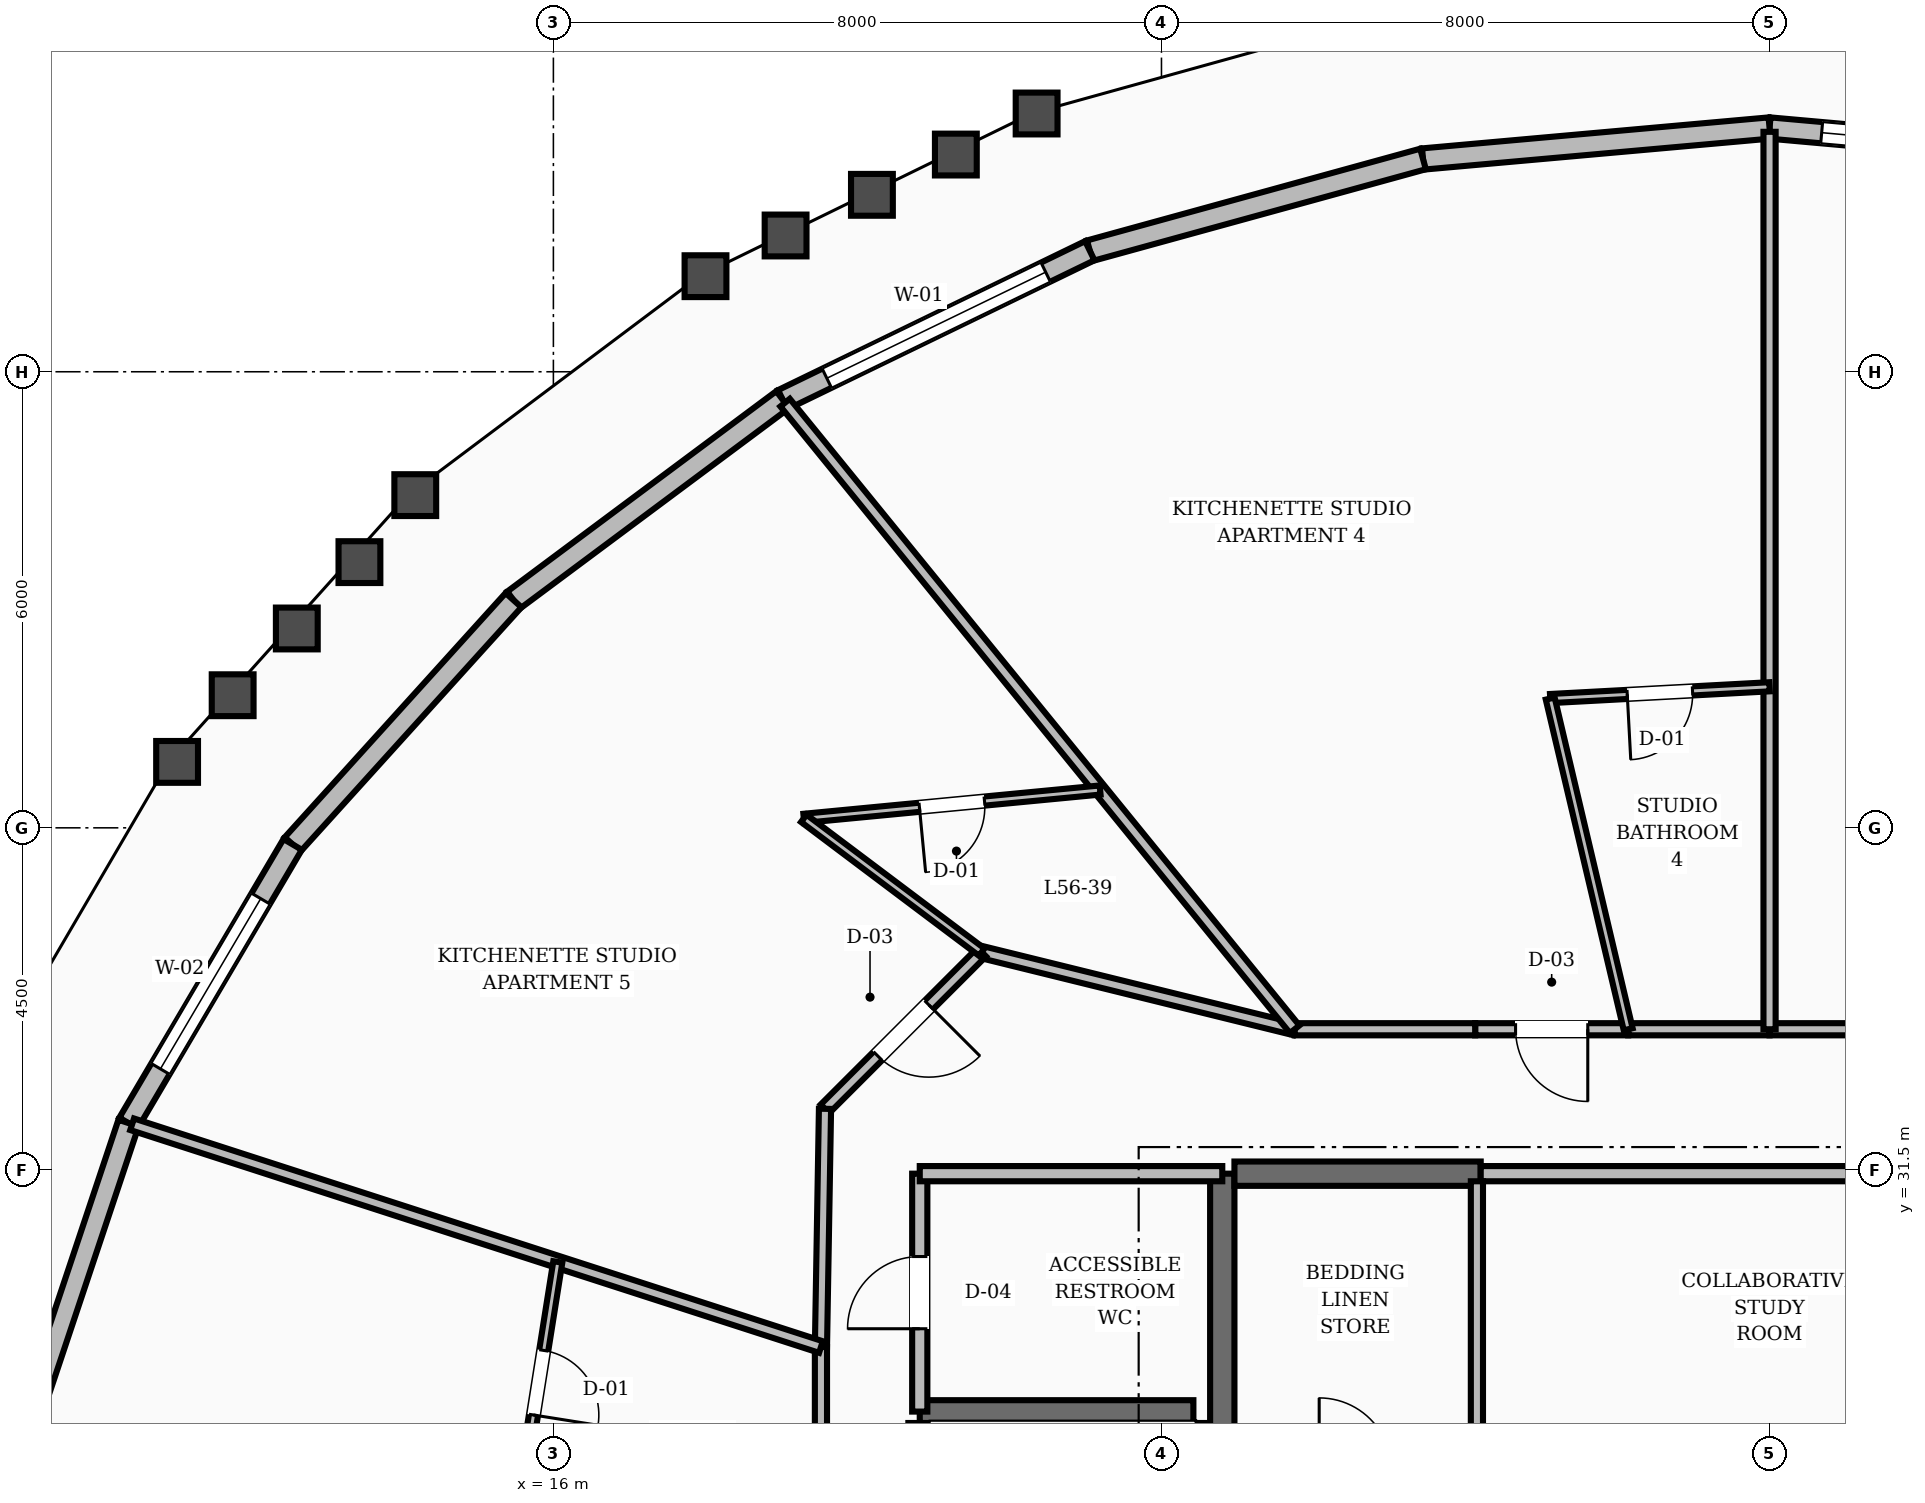
"""IFC4 building model, lengths in metres.
Left out: names, types, materials, properties, quantities, classifications, styles, units other than length and angle.
Written with IfcOpenShell. Run it as: python <this file> out.ifc"""

import sys

from ifc_helpers import new_model, si_unit, direction, frame, frame_2d, origin, place, context, subcontext, project, spatial, rectangle, extrude, element, fill, save


model = new_model("IFC4")
c1 = context("Model", 3, precision=1e-05, world=origin(), true_north=direction((0.0, 1.0)))
c2 = subcontext(c1, "Body", "Model", "MODEL_VIEW")
j1 = project(units=[si_unit("LENGTHUNIT", "METRE"), si_unit("PLANEANGLEUNIT", "RADIAN")], contexts=[c1])
p1 = place(None, origin())
s1 = spatial("IfcSite", under=j1, at=p1, CompositionType="ELEMENT")
p2 = place(p1, origin())
s2 = spatial("IfcBuilding", under=s1, at=p2, CompositionType="ELEMENT")
p3 = place(p2, frame((0.0, 0.0, 218.4)))
s3 = spatial("IfcBuildingStorey", under=s2, at=p3, CompositionType="ELEMENT", Elevation=218.4)
p4 = place(p3, frame((24.8, 25.15, 0.0), z_axis=(0.0, 0.0, 1.0), x_axis=(0.0, 1.0, 0.0)))
e1 = element("IfcWall", 1, at=p4, inside=s3, PredefinedType="SHEAR", context=c2, shape_type="SweptSolid", body=[
    extrude(rectangle(XDim=6.3, YDim=0.32, at=frame_2d((3.15, 0.0))), origin(), (0.0, 0.0, 1.0), 3.6),
])
p5 = place(p3, frame((24.96, 31.45, 0.0), z_axis=(0.0, 0.0, 1.0), x_axis=(1.0, 0.0, 0.0)))
e2 = element("IfcWall", 2, at=p5, inside=s3, PredefinedType="SHEAR", context=c2, shape_type="SweptSolid", body=[
    extrude(rectangle(XDim=3.24, YDim=0.32, at=frame_2d((1.62, 0.0))), origin(), (0.0, 0.0, 1.0), 3.6),
])
for number, where, z_axis, x_axis in (
    (3, (20.82, 19.43, 0.0), (0.0, 0.0, 1.0), (0.0, 1.0, 0.0)),
    (4, (24.42, 19.43, 0.0), (0.0, 0.0, 1.0), (0.0, 1.0, 0.0)),
):
    element("IfcWall", number, at=place(p3, frame(where, z_axis=z_axis, x_axis=x_axis)), inside=s3, PredefinedType="SHEAR", context=c2, shape_type="SweptSolid", body=[
        extrude(rectangle(XDim=8.74, YDim=0.3, at=frame_2d((4.37, 0.0))), origin(), (0.0, 0.0, 1.0), 3.6),
    ])
p6 = place(p3, frame((20.82, 28.32, 0.0), z_axis=(0.0, 0.0, 1.0), x_axis=(1.0, 0.0, 0.0)))
e5 = element("IfcWall", 5, at=p6, inside=s3, PredefinedType="SHEAR", context=c2, shape_type="SweptSolid", body=[
    extrude(rectangle(XDim=3.6, YDim=0.3, at=frame_2d((1.8, 0.0))), origin(), (0.0, 0.0, 1.0), 3.6),
])
p7 = place(p3, frame((36.559, 44.799, 0.0), z_axis=(0.0, 0.0, 1.0), x_axis=(-0.996029770712, 0.089020760807, 0.0)))
e6 = element("IfcWall", 6, at=p7, inside=s3, PredefinedType="STANDARD", context=c2, shape_type="SweptSolid", body=[
    extrude(rectangle(XDim=4.577, YDim=0.28, at=frame_2d((2.289, 0.0))), origin(), (0.0, 0.0, 1.0), 2.88),
])
p8 = place(p7, frame((0.689, 0.0, 0.8)))
e7 = element("IfcOpeningElement", 7, at=p8, cuts=e6, PredefinedType="OPENING", context=c2, shape_type="SweptSolid", body=[
    extrude(rectangle(XDim=3.2, YDim=1.65, at=frame_2d((1.6, 0.825))), frame((0.0, 0.15, 0.0), z_axis=(0.0, -1.0, 0.0), x_axis=(1.0, 0.0, 0.0)), (0.0, 0.0, 1.0), 0.3),
])
p9 = place(p3, frame((32.0, 45.207, 0.0), z_axis=(0.0, 0.0, 1.0), x_axis=(-0.996029770712, -0.089020760807, 0.0)))
e8 = element("IfcWall", 8, at=p9, inside=s3, PredefinedType="STANDARD", context=c2, shape_type="SweptSolid", body=[
    extrude(rectangle(XDim=4.577, YDim=0.28, at=frame_2d((2.289, 0.0))), origin(), (0.0, 0.0, 1.0), 2.88),
])
p10 = place(p3, frame((27.441, 44.799, 0.0), z_axis=(0.0, 0.0, 1.0), x_axis=(-0.964121606476, -0.265460972511, 0.0)))
e9 = element("IfcWall", 9, at=p10, inside=s3, PredefinedType="STANDARD", context=c2, shape_type="SweptSolid", body=[
    extrude(rectangle(XDim=4.547, YDim=0.28, at=frame_2d((2.273, 0.0))), origin(), (0.0, 0.0, 1.0), 2.88),
])
p11 = place(p3, frame((23.057, 43.592, 0.0), z_axis=(0.0, 0.0, 1.0), x_axis=(-0.899755886265, -0.436393566785, 0.0)))
e10 = element("IfcWall", 10, at=p11, inside=s3, PredefinedType="STANDARD", context=c2, shape_type="SweptSolid", body=[
    extrude(rectangle(XDim=4.49, YDim=0.28, at=frame_2d((2.245, 0.0))), origin(), (0.0, 0.0, 1.0), 2.88),
])
p12 = place(p11, frame((0.645, 0.0, 0.8)))
e11 = element("IfcOpeningElement", 11, at=p12, cuts=e10, PredefinedType="OPENING", context=c2, shape_type="SweptSolid", body=[
    extrude(rectangle(XDim=3.2, YDim=1.65, at=frame_2d((1.6, 0.825))), frame((0.0, 0.15, 0.0), z_axis=(0.0, -1.0, 0.0), x_axis=(1.0, 0.0, 0.0)), (0.0, 0.0, 1.0), 0.3),
])
p13 = place(p3, frame((19.017, 41.633, 0.0), z_axis=(0.0, 0.0, 1.0), x_axis=(-0.802005914902, -0.597316090912, 0.0)))
e12 = element("IfcWall", 12, at=p13, inside=s3, PredefinedType="STANDARD", context=c2, shape_type="SweptSolid", body=[
    extrude(rectangle(XDim=4.416, YDim=0.28, at=frame_2d((2.208, 0.0))), origin(), (0.0, 0.0, 1.0), 2.88),
])
p14 = place(p3, frame((15.476, 38.995, 0.0), z_axis=(0.0, 0.0, 1.0), x_axis=(-0.670746586543, -0.741686602711, 0.0)))
e13 = element("IfcWall", 13, at=p14, inside=s3, PredefinedType="STANDARD", context=c2, shape_type="SweptSolid", body=[
    extrude(rectangle(XDim=4.333, YDim=0.28, at=frame_2d((2.167, 0.0))), origin(), (0.0, 0.0, 1.0), 2.88),
])
p15 = place(p3, frame((12.57, 35.782, 0.0), z_axis=(0.0, 0.0, 1.0), x_axis=(-0.50750901232, -0.861646448617, 0.0)))
e14 = element("IfcWall", 14, at=p15, inside=s3, PredefinedType="STANDARD", context=c2, shape_type="SweptSolid", body=[
    extrude(rectangle(XDim=4.255, YDim=0.28, at=frame_2d((2.127, 0.0))), origin(), (0.0, 0.0, 1.0), 2.88),
])
p16 = place(p15, frame((0.827, 0.0, 0.8)))
e15 = element("IfcOpeningElement", 15, at=p16, cuts=e14, PredefinedType="OPENING", context=c2, shape_type="SweptSolid", body=[
    extrude(rectangle(XDim=2.6, YDim=1.65, at=frame_2d((1.3, 0.825))), frame((0.0, 0.15, 0.0), z_axis=(0.0, -1.0, 0.0), x_axis=(1.0, 0.0, 0.0)), (0.0, 0.0, 1.0), 0.3),
])
p17 = place(p3, frame((10.41, 32.115, 0.0), z_axis=(0.0, 0.0, 1.0), x_axis=(-0.317030851827, -0.948415224989, 0.0)))
e16 = element("IfcWall", 16, at=p17, inside=s3, PredefinedType="STANDARD", context=c2, shape_type="SweptSolid", body=[
    extrude(rectangle(XDim=4.195, YDim=0.28, at=frame_2d((2.097, 0.0))), origin(), (0.0, 0.0, 1.0), 2.88),
])
p18 = place(p3, frame((20.82, 28.32, 0.0), z_axis=(0.0, 0.0, 1.0), x_axis=(0.0, 1.0, 0.0)))
e17 = element("IfcWall", 17, at=p18, inside=s3, PredefinedType="SOLIDWALL", context=c2, shape_type="SweptSolid", body=[
    extrude(rectangle(XDim=3.13, YDim=0.2, at=frame_2d((1.565, 0.0))), origin(), (0.0, 0.0, 1.0), 2.87),
])
p19 = place(p18, frame((1.09, 0.0, 0.0)))
e18 = element("IfcOpeningElement", 18, at=p19, cuts=e17, PredefinedType="OPENING", context=c2, shape_type="SweptSolid", body=[
    extrude(rectangle(XDim=0.95, YDim=2.1, at=frame_2d((0.475, 1.05))), frame((0.0, 0.11, 0.0), z_axis=(0.0, -1.0, 0.0), x_axis=(1.0, 0.0, 0.0)), (0.0, 0.0, 1.0), 0.22),
])
p20 = place(p3, frame((20.82, 31.45, 0.0), z_axis=(0.0, 0.0, 1.0), x_axis=(1.0, 0.0, 0.0)))
e19 = element("IfcWall", 19, at=p20, inside=s3, PredefinedType="SOLIDWALL", context=c2, shape_type="SweptSolid", body=[
    extrude(rectangle(XDim=3.98, YDim=0.2, at=frame_2d((1.99, 0.0))), origin(), (0.0, 0.0, 1.0), 2.87),
])
p21 = place(p3, frame((28.2, 31.45, 0.0), z_axis=(0.0, 0.0, 1.0), x_axis=(1.0, 0.0, 0.0)))
e20 = element("IfcWall", 20, at=p21, inside=s3, PredefinedType="SOLIDWALL", context=c2, shape_type="SweptSolid", body=[
    extrude(rectangle(XDim=7.6, YDim=0.2, at=frame_2d((3.8, 0.0))), origin(), (0.0, 0.0, 1.0), 2.87),
])
p22 = place(p3, frame((28.15, 25.25, 0.0), z_axis=(0.0, 0.0, 1.0), x_axis=(0.0, 1.0, 0.0)))
e21 = element("IfcWall", 21, at=p22, inside=s3, PredefinedType="SOLIDWALL", context=c2, shape_type="SweptSolid", body=[
    extrude(rectangle(XDim=6.1, YDim=0.16, at=frame_2d((3.05, 0.0))), origin(), (0.0, 0.0, 1.0), 2.87),
])
for number, where, z_axis, x_axis in (
    (22, (33.86, 33.35, 0.0), (0.0, 0.0, 1.0), (-1.0, 0.0, 0.0)),
    (23, (32.0, 33.35, 0.0), (0.0, 0.0, 1.0), (-1.0, 0.0, 0.0)),
):
    element("IfcWall", number, at=place(p3, frame(where, z_axis=z_axis, x_axis=x_axis)), inside=s3, PredefinedType="SOLIDWALL", context=c2, shape_type="SweptSolid", body=[
        extrude(rectangle(XDim=1.86, YDim=0.16, at=frame_2d((0.93, 0.0))), origin(), (0.0, 0.0, 1.0), 2.87),
    ])
p23 = place(p3, frame((30.14, 33.35, 0.0), z_axis=(0.0, 0.0, 1.0), x_axis=(-1.0, 0.0, 0.0)))
e24 = element("IfcWall", 24, at=p23, inside=s3, PredefinedType="SOLIDWALL", context=c2, shape_type="SweptSolid", body=[
    extrude(rectangle(XDim=2.013, YDim=0.16, at=frame_2d((1.006, 0.0))), origin(), (0.0, 0.0, 1.0), 2.87),
])
p24 = place(p23, frame((0.531, 0.0, 0.0)))
e25 = element("IfcOpeningElement", 25, at=p24, cuts=e24, PredefinedType="OPENING", context=c2, shape_type="SweptSolid", body=[
    extrude(rectangle(XDim=0.95, YDim=2.1, at=frame_2d((0.475, 1.05))), frame((0.0, 0.09, 0.0), z_axis=(0.0, -1.0, 0.0), x_axis=(1.0, 0.0, 0.0)), (0.0, 0.0, 1.0), 0.18),
])
p25 = place(p3, frame((28.127, 33.35, 0.0), z_axis=(0.0, 0.0, 1.0), x_axis=(-1.0, 0.0, 0.0)))
e26 = element("IfcWall", 26, at=p25, inside=s3, PredefinedType="SOLIDWALL", context=c2, shape_type="SweptSolid", body=[
    extrude(rectangle(XDim=2.375, YDim=0.16, at=frame_2d((1.188, 0.0))), origin(), (0.0, 0.0, 1.0), 2.87),
])
p26 = place(p3, frame((25.752, 33.35, 0.0), z_axis=(0.0, 0.0, 1.0), x_axis=(-0.970939799552, 0.239323850978, 0.0)))
e27 = element("IfcWall", 27, at=p26, inside=s3, PredefinedType="SOLIDWALL", context=c2, shape_type="SweptSolid", body=[
    extrude(rectangle(XDim=4.241, YDim=0.16, at=frame_2d((2.12, 0.0))), origin(), (0.0, 0.0, 1.0), 2.87),
])
p27 = place(p3, frame((21.635, 34.365, 0.0), z_axis=(0.0, 0.0, 1.0), x_axis=(-0.707106781187, -0.707106781187, 0.0)))
e28 = element("IfcWall", 28, at=p27, inside=s3, PredefinedType="SOLIDWALL", context=c2, shape_type="SweptSolid", body=[
    extrude(rectangle(XDim=2.916, YDim=0.16, at=frame_2d((1.458, 0.0))), origin(), (0.0, 0.0, 1.0), 2.87),
])
p28 = place(p27, frame((0.983, 0.0, 0.0)))
e29 = element("IfcOpeningElement", 29, at=p28, cuts=e28, PredefinedType="OPENING", context=c2, shape_type="SweptSolid", body=[
    extrude(rectangle(XDim=0.95, YDim=2.1, at=frame_2d((0.475, 1.05))), frame((0.0, 0.09, 0.0), z_axis=(0.0, -1.0, 0.0), x_axis=(1.0, 0.0, 0.0)), (0.0, 0.0, 1.0), 0.18),
])
p29 = place(p3, frame((19.573, 32.303, 0.0), z_axis=(0.0, 0.0, 1.0), x_axis=(-0.016981035134, -0.999855811828, 0.0)))
e30 = element("IfcWall", 30, at=p29, inside=s3, PredefinedType="SOLIDWALL", context=c2, shape_type="SweptSolid", body=[
    extrude(rectangle(XDim=3.134, YDim=0.16, at=frame_2d((1.567, 0.0))), origin(), (0.0, 0.0, 1.0), 2.87),
])
p30 = place(p3, frame((19.52, 29.169, 0.0), z_axis=(0.0, 0.0, 1.0), x_axis=(0.0, -1.0, 0.0)))
e31 = element("IfcWall", 31, at=p30, inside=s3, PredefinedType="SOLIDWALL", context=c2, shape_type="SweptSolid", body=[
    extrude(rectangle(XDim=2.687, YDim=0.16, at=frame_2d((1.344, 0.0))), origin(), (0.0, 0.0, 1.0), 2.87),
])
p31 = place(p3, frame((32.0, 33.35, 0.0), z_axis=(0.0, 0.0, 1.0), x_axis=(0.0, 1.0, 0.0)))
e32 = element("IfcWall", 32, at=p31, inside=s3, PredefinedType="SOLIDWALL", context=c2, shape_type="SweptSolid", body=[
    extrude(rectangle(XDim=11.807, YDim=0.16, at=frame_2d((5.903, 0.0))), origin(), (0.0, 0.0, 1.0), 2.87),
])
p32 = place(p3, frame((32.0, 37.855, 0.0), z_axis=(0.0, 0.0, 1.0), x_axis=(-0.998564341908, -0.053565427935, 0.0)))
e33 = element("IfcWall", 33, at=p32, inside=s3, PredefinedType="PARTITIONING", context=c2, shape_type="SweptSolid", body=[
    extrude(rectangle(XDim=2.89, YDim=0.12, at=frame_2d((1.445, 0.0))), origin(), (0.0, 0.0, 1.0), 2.87),
])
p33 = place(p32, frame((1.015, 0.0, 0.0)))
e34 = element("IfcOpeningElement", 34, at=p33, cuts=e33, PredefinedType="OPENING", context=c2, shape_type="SweptSolid", body=[
    extrude(rectangle(XDim=0.86, YDim=2.1, at=frame_2d((0.43, 1.05))), frame((0.0, 0.07, 0.0), z_axis=(0.0, -1.0, 0.0), x_axis=(1.0, 0.0, 0.0)), (0.0, 0.0, 1.0), 0.14),
])
p34 = place(p3, frame((30.14, 33.35, 0.0), z_axis=(0.0, 0.0, 1.0), x_axis=(-0.229456390551, 0.973318943017, 0.0)))
e35 = element("IfcWall", 35, at=p34, inside=s3, PredefinedType="PARTITIONING", context=c2, shape_type="SweptSolid", body=[
    extrude(rectangle(XDim=4.47, YDim=0.12, at=frame_2d((2.235, 0.0))), origin(), (0.0, 0.0, 1.0), 2.87),
])
p35 = place(p3, frame((25.752, 33.35, 0.0), z_axis=(0.0, 0.0, 1.0), x_axis=(-0.630915216518, 0.775851783246, 0.0)))
e36 = element("IfcWall", 36, at=p35, inside=s3, PredefinedType="SOLIDWALL", context=c2, shape_type="SweptSolid", body=[
    extrude(rectangle(XDim=10.625, YDim=0.16, at=frame_2d((5.313, 0.0))), origin(), (0.0, 0.0, 1.0), 2.87),
])
p36 = place(p3, frame((23.193, 36.497, 0.0), z_axis=(0.0, 0.0, 1.0), x_axis=(-0.995459258823, -0.09518857087, 0.0)))
e37 = element("IfcWall", 37, at=p36, inside=s3, PredefinedType="PARTITIONING", context=c2, shape_type="SweptSolid", body=[
    extrude(rectangle(XDim=3.917, YDim=0.12, at=frame_2d((1.958, 0.0))), origin(), (0.0, 0.0, 1.0), 2.87),
])
p37 = place(p36, frame((1.528, 0.0, 0.0)))
e38 = element("IfcOpeningElement", 38, at=p37, cuts=e37, PredefinedType="OPENING", context=c2, shape_type="SweptSolid", body=[
    extrude(rectangle(XDim=0.86, YDim=2.1, at=frame_2d((0.43, 1.05))), frame((0.0, 0.07, 0.0), z_axis=(0.0, -1.0, 0.0), x_axis=(1.0, 0.0, 0.0)), (0.0, 0.0, 1.0), 0.14),
])
p38 = place(p3, frame((21.635, 34.365, 0.0), z_axis=(0.0, 0.0, 1.0), x_axis=(-0.79932915478, 0.6008934201, 0.0)))
e39 = element("IfcWall", 39, at=p38, inside=s3, PredefinedType="PARTITIONING", context=c2, shape_type="SweptSolid", body=[
    extrude(rectangle(XDim=2.928, YDim=0.12, at=frame_2d((1.464, 0.0))), origin(), (0.0, 0.0, 1.0), 2.87),
])
p39 = place(p3, frame((19.52, 29.169, 0.0), z_axis=(0.0, 0.0, 1.0), x_axis=(-0.951482710275, 0.307702213264, 0.0)))
e40 = element("IfcWall", 40, at=p39, inside=s3, PredefinedType="SOLIDWALL", context=c2, shape_type="SweptSolid", body=[
    extrude(rectangle(XDim=9.524, YDim=0.16, at=frame_2d((4.762, 0.0))), origin(), (0.0, 0.0, 1.0), 2.87),
])
p40 = place(p3, frame((16.058, 30.289, 0.0), z_axis=(0.0, 0.0, 1.0), x_axis=(-0.156987224251, -0.987600633567, 0.0)))
e41 = element("IfcWall", 41, at=p40, inside=s3, PredefinedType="PARTITIONING", context=c2, shape_type="SweptSolid", body=[
    extrude(rectangle(XDim=3.218, YDim=0.12, at=frame_2d((1.609, 0.0))), origin(), (0.0, 0.0, 1.0), 2.87),
])
p41 = place(p40, frame((1.179, 0.0, 0.0)))
e42 = element("IfcOpeningElement", 42, at=p41, cuts=e41, PredefinedType="OPENING", context=c2, shape_type="SweptSolid", body=[
    extrude(rectangle(XDim=0.86, YDim=2.1, at=frame_2d((0.43, 1.05))), frame((0.0, 0.07, 0.0), z_axis=(0.0, -1.0, 0.0), x_axis=(1.0, 0.0, 0.0)), (0.0, 0.0, 1.0), 0.14),
])
p42 = place(p8, origin())
e43 = element("IfcWindow", 43, at=p42, inside=s3, PartitioningType="SINGLE_PANEL", PredefinedType="WINDOW", context=c2, shape_type="SweptSolid", body=[
    extrude(rectangle(XDim=3.2, YDim=1.65, at=frame_2d((1.6, 0.825))), frame((0.0, 0.03, 0.0), z_axis=(0.0, -1.0, 0.0), x_axis=(1.0, 0.0, 0.0)), (0.0, 0.0, 1.0), 0.06),
])
fill(e7, e43)
p43 = place(p12, origin())
e44 = element("IfcWindow", 44, at=p43, inside=s3, PartitioningType="SINGLE_PANEL", PredefinedType="WINDOW", context=c2, shape_type="SweptSolid", body=[
    extrude(rectangle(XDim=3.2, YDim=1.65, at=frame_2d((1.6, 0.825))), frame((0.0, 0.03, 0.0), z_axis=(0.0, -1.0, 0.0), x_axis=(1.0, 0.0, 0.0)), (0.0, 0.0, 1.0), 0.06),
])
fill(e11, e44)
p44 = place(p16, origin())
e45 = element("IfcWindow", 45, at=p44, inside=s3, PartitioningType="SINGLE_PANEL", PredefinedType="WINDOW", context=c2, shape_type="SweptSolid", body=[
    extrude(rectangle(XDim=2.6, YDim=1.65, at=frame_2d((1.3, 0.825))), frame((0.0, 0.03, 0.0), z_axis=(0.0, -1.0, 0.0), x_axis=(1.0, 0.0, 0.0)), (0.0, 0.0, 1.0), 0.06),
])
fill(e15, e45)
p45 = place(p19, origin())
e46 = element("IfcDoor", 46, at=p45, inside=s3, OperationType="SINGLE_SWING_LEFT", PredefinedType="DOOR", context=c2, shape_type="SweptSolid", body=[
    extrude(rectangle(XDim=0.95, YDim=2.1, at=frame_2d((0.475, 1.05))), frame((0.0, 0.025, 0.0), z_axis=(0.0, -1.0, 0.0), x_axis=(1.0, 0.0, 0.0)), (0.0, 0.0, 1.0), 0.05),
])
fill(e18, e46)
p46 = place(p33, origin())
e47 = element("IfcDoor", 47, at=p46, inside=s3, OperationType="SINGLE_SWING_RIGHT", PredefinedType="DOOR", context=c2, shape_type="SweptSolid", body=[
    extrude(rectangle(XDim=0.86, YDim=2.1, at=frame_2d((0.43, 1.05))), frame((0.0, 0.025, 0.0), z_axis=(0.0, -1.0, 0.0), x_axis=(1.0, 0.0, 0.0)), (0.0, 0.0, 1.0), 0.05),
])
fill(e34, e47)
p47 = place(p24, origin())
e48 = element("IfcDoor", 48, at=p47, inside=s3, OperationType="SINGLE_SWING_LEFT", PredefinedType="DOOR", context=c2, shape_type="SweptSolid", body=[
    extrude(rectangle(XDim=0.95, YDim=2.1, at=frame_2d((0.475, 1.05))), frame((0.0, 0.025, 0.0), z_axis=(0.0, -1.0, 0.0), x_axis=(1.0, 0.0, 0.0)), (0.0, 0.0, 1.0), 0.05),
])
fill(e25, e48)
p48 = place(p37, origin())
e49 = element("IfcDoor", 49, at=p48, inside=s3, OperationType="SINGLE_SWING_RIGHT", PredefinedType="DOOR", context=c2, shape_type="SweptSolid", body=[
    extrude(rectangle(XDim=0.86, YDim=2.1, at=frame_2d((0.43, 1.05))), frame((0.0, 0.025, 0.0), z_axis=(0.0, -1.0, 0.0), x_axis=(1.0, 0.0, 0.0)), (0.0, 0.0, 1.0), 0.05),
])
fill(e38, e49)
p49 = place(p28, origin())
e50 = element("IfcDoor", 50, at=p49, inside=s3, OperationType="SINGLE_SWING_LEFT", PredefinedType="DOOR", context=c2, shape_type="SweptSolid", body=[
    extrude(rectangle(XDim=0.95, YDim=2.1, at=frame_2d((0.475, 1.05))), frame((0.0, 0.025, 0.0), z_axis=(0.0, -1.0, 0.0), x_axis=(1.0, 0.0, 0.0)), (0.0, 0.0, 1.0), 0.05),
])
fill(e29, e50)
p50 = place(p41, origin())
e51 = element("IfcDoor", 51, at=p50, inside=s3, OperationType="SINGLE_SWING_RIGHT", PredefinedType="DOOR", context=c2, shape_type="SweptSolid", body=[
    extrude(rectangle(XDim=0.86, YDim=2.1, at=frame_2d((0.43, 1.05))), frame((0.0, 0.025, 0.0), z_axis=(0.0, -1.0, 0.0), x_axis=(1.0, 0.0, 0.0)), (0.0, 0.0, 1.0), 0.05),
])
fill(e42, e51)
save(model, sys.argv[1])
